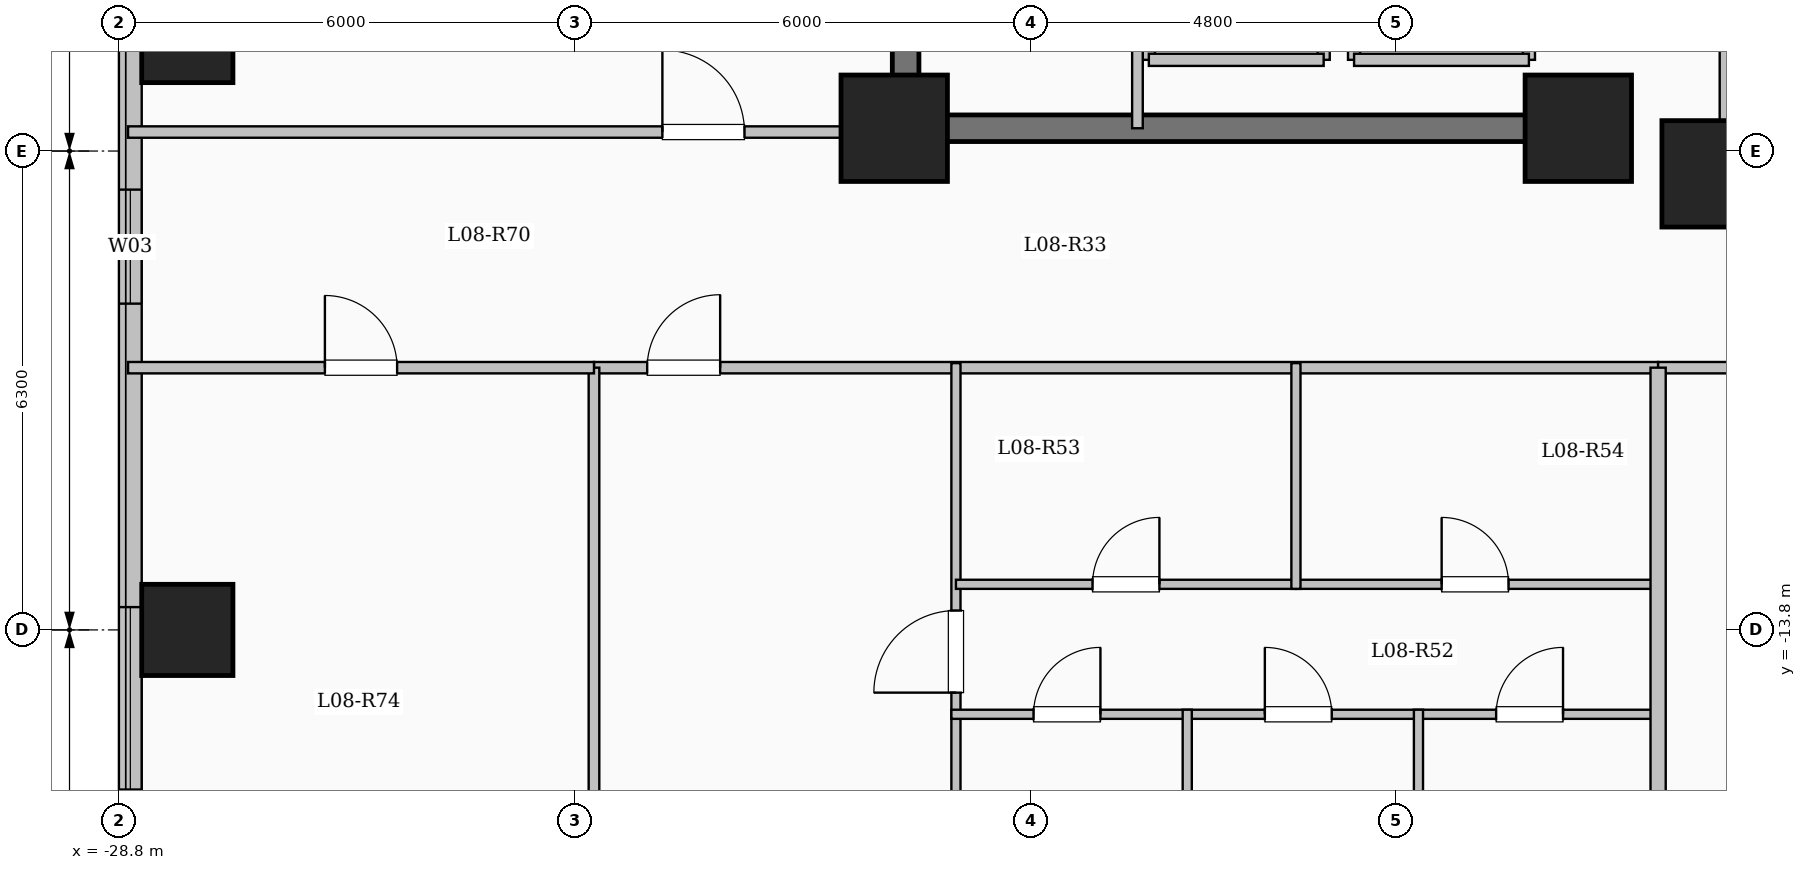
"""IFC4 building model, lengths in metres.
Left out: names, types, materials, properties, quantities, classifications, styles, units other than length and angle.
Written with IfcOpenShell. Run it as: python <this file> out.ifc"""

import sys

from ifc_helpers import new_model, si_unit, direction, frame, frame_2d, origin, origin_2d, place, context, subcontext, project, spatial, rectangle, extrude, element, fill, save


model = new_model("IFC4")
c1 = context("Model", 3, precision=1e-05, world=origin(), true_north=direction((0.0, 1.0)))
c2 = subcontext(c1, "Body", "Model", "MODEL_VIEW")
j1 = project(units=[si_unit("LENGTHUNIT", "METRE"), si_unit("PLANEANGLEUNIT", "RADIAN")], contexts=[c1])
p1 = place(None, origin())
s1 = spatial("IfcSite", under=j1, at=p1, CompositionType="ELEMENT")
p2 = place(p1, origin())
s2 = spatial("IfcBuilding", under=s1, at=p2, CompositionType="ELEMENT")
p3 = place(p2, frame((0.0, 0.0, 34.05)))
s3 = spatial("IfcBuildingStorey", under=s2, at=p3, CompositionType="ELEMENT", Elevation=34.05)
for number, where, z_axis, x_axis in (
    (1, (-7.8, -7.8, 0.0), (0.0, 0.0, 1.0), (1.0, 0.0, 0.0)),
    (2, (-9.6, -7.2, 0.0), (0.0, 0.0, 1.0), (1.0, 0.0, 0.0)),
    (3, (-18.6, -7.2, 0.0), (0.0, 0.0, 1.0), (1.0, 0.0, 0.0)),
):
    element("IfcColumn", number, at=place(p3, frame(where, z_axis=z_axis, x_axis=x_axis)), inside=s3, PredefinedType="COLUMN", context=c2, shape_type="SweptSolid", body=[
        extrude(rectangle(XDim=1.4, YDim=1.4, at=origin_2d()), origin(), (0.0, 0.0, 1.0), 3.35),
    ])
for number, where, z_axis, x_axis in (
    (4, (-27.9, -13.8, 0.0), (0.0, 0.0, 1.0), (1.0, 0.0, 0.0)),
    (5, (-27.9, -6.0, 0.0), (0.0, 0.0, 1.0), (1.0, 0.0, 0.0)),
):
    element("IfcColumn", number, at=place(p3, frame(where, z_axis=z_axis, x_axis=x_axis)), inside=s3, PredefinedType="COLUMN", context=c2, shape_type="SweptSolid", body=[
        extrude(rectangle(XDim=1.2, YDim=1.2, at=origin_2d()), origin(), (0.0, 0.0, 1.0), 3.35),
    ])
p4 = place(p3, frame((-7.62, 7.62, 0.0), z_axis=(0.0, 0.0, 1.0), x_axis=(0.0, -1.0, 0.0)))
e6 = element("IfcWall", 6, at=p4, inside=s3, PredefinedType="SOLIDWALL", context=c2, shape_type="SweptSolid", body=[
    extrude(rectangle(XDim=15.24, YDim=0.24, at=frame_2d((7.62, 0.0))), origin(), (0.0, 0.0, 1.0), 3.1),
])
p5 = place(p4, frame((6.92, 0.0, 0.95)))
e7 = element("IfcOpeningElement", 7, at=p5, cuts=e6, PredefinedType="OPENING", context=c2, shape_type="SweptSolid", body=[
    extrude(rectangle(XDim=1.4, YDim=1.5, at=frame_2d((0.7, 0.75))), frame((0.0, 0.13, 0.0), z_axis=(0.0, -1.0, 0.0), x_axis=(1.0, 0.0, 0.0)), (0.0, 0.0, 1.0), 0.26),
])
p6 = place(p3, frame((-28.65, -19.05, 0.0), z_axis=(0.0, 0.0, 1.0), x_axis=(0.0, 1.0, 0.0)))
e8 = element("IfcWall", 8, at=p6, inside=s3, PredefinedType="SOLIDWALL", context=c2, shape_type="SweptSolid", body=[
    extrude(rectangle(XDim=38.1, YDim=0.3, at=frame_2d((19.05, 0.0))), origin(), (0.0, 0.0, 1.0), 3.1),
])
p7 = place(p6, frame((3.15, 0.0, 0.9)))
e9 = element("IfcOpeningElement", 9, at=p7, cuts=e8, PredefinedType="OPENING", context=c2, shape_type="SweptSolid", body=[
    extrude(rectangle(XDim=2.4, YDim=1.8, at=frame_2d((1.2, 0.9))), frame((0.0, 0.16, 0.0), z_axis=(0.0, -1.0, 0.0), x_axis=(1.0, 0.0, 0.0)), (0.0, 0.0, 1.0), 0.32),
])
p8 = place(p6, frame((9.542, 0.0, 0.9)))
e10 = element("IfcOpeningElement", 10, at=p8, cuts=e8, PredefinedType="OPENING", context=c2, shape_type="SweptSolid", body=[
    extrude(rectangle(XDim=1.5, YDim=1.65, at=frame_2d((0.75, 0.825))), frame((0.0, 0.16, 0.0), z_axis=(0.0, -1.0, 0.0), x_axis=(1.0, 0.0, 0.0)), (0.0, 0.0, 1.0), 0.32),
])
p9 = place(p6, frame((19.8, 0.0, 0.9)))
e11 = element("IfcOpeningElement", 11, at=p9, cuts=e8, PredefinedType="OPENING", context=c2, shape_type="SweptSolid", body=[
    extrude(rectangle(XDim=2.0, YDim=1.7, at=frame_2d((1.0, 0.85))), frame((0.0, 0.16, 0.0), z_axis=(0.0, -1.0, 0.0), x_axis=(1.0, 0.0, 0.0)), (0.0, 0.0, 1.0), 0.32),
])
p10 = place(p6, frame((30.175, 0.0, 0.95)))
e12 = element("IfcOpeningElement", 12, at=p10, cuts=e8, PredefinedType="OPENING", context=c2, shape_type="SweptSolid", body=[
    extrude(rectangle(XDim=1.0, YDim=1.5, at=frame_2d((0.5, 0.75))), frame((0.0, 0.16, 0.0), z_axis=(0.0, -1.0, 0.0), x_axis=(1.0, 0.0, 0.0)), (0.0, 0.0, 1.0), 0.32),
])
p11 = place(p6, frame((33.85, 0.0, 0.9)))
e13 = element("IfcOpeningElement", 13, at=p11, cuts=e8, PredefinedType="OPENING", context=c2, shape_type="SweptSolid", body=[
    extrude(rectangle(XDim=2.0, YDim=1.7, at=frame_2d((1.0, 0.85))), frame((0.0, 0.16, 0.0), z_axis=(0.0, -1.0, 0.0), x_axis=(1.0, 0.0, 0.0)), (0.0, 0.0, 1.0), 0.32),
])
p12 = place(p3, frame((-12.55, -6.3, 0.0), z_axis=(0.0, 0.0, 1.0), x_axis=(0.0, 1.0, 0.0)))
e14 = element("IfcWall", 14, at=p12, inside=s3, PredefinedType="SOLIDWALL", context=c2, shape_type="SweptSolid", body=[
    extrude(rectangle(XDim=2.6, YDim=0.16, at=frame_2d((1.3, 0.0))), origin(), (0.0, 0.0, 1.0), 3.1),
])
p13 = place(p3, frame((-10.25, -6.3, 0.0), z_axis=(0.0, 0.0, 1.0), x_axis=(0.0, 1.0, 0.0)))
e15 = element("IfcWall", 15, at=p13, inside=s3, PredefinedType="SOLIDWALL", context=c2, shape_type="SweptSolid", body=[
    extrude(rectangle(XDim=2.6, YDim=0.16, at=frame_2d((1.3, 0.0))), origin(), (0.0, 0.0, 1.0), 3.1),
])
p14 = place(p13, frame((0.75, 0.0, 0.0)))
e16 = element("IfcOpeningElement", 16, at=p14, cuts=e15, PredefinedType="OPENING", context=c2, shape_type="SweptSolid", body=[
    extrude(rectangle(XDim=1.1, YDim=2.15, at=frame_2d((0.55, 1.075))), frame((0.0, 0.09, 0.0), z_axis=(0.0, -1.0, 0.0), x_axis=(1.0, 0.0, 0.0)), (0.0, 0.0, 1.0), 0.18),
])
p15 = place(p3, frame((-12.55, -6.3, 0.0), z_axis=(0.0, 0.0, 1.0), x_axis=(1.0, 0.0, 0.0)))
e17 = element("IfcWall", 17, at=p15, inside=s3, PredefinedType="SOLIDWALL", context=c2, shape_type="SweptSolid", body=[
    extrude(rectangle(XDim=2.3, YDim=0.16, at=frame_2d((1.15, 0.0))), origin(), (0.0, 0.0, 1.0), 3.1),
])
for number, where, z_axis, x_axis in (
    (18, (-15.25, -6.3, 0.0), (0.0, 0.0, 1.0), (0.0, 1.0, 0.0)),
    (19, (-12.95, -6.3, 0.0), (0.0, 0.0, 1.0), (0.0, 1.0, 0.0)),
):
    element("IfcWall", number, at=place(p3, frame(where, z_axis=z_axis, x_axis=x_axis)), inside=s3, PredefinedType="SOLIDWALL", context=c2, shape_type="SweptSolid", body=[
        extrude(rectangle(XDim=2.6, YDim=0.16, at=frame_2d((1.3, 0.0))), origin(), (0.0, 0.0, 1.0), 3.1),
    ])
p16 = place(p3, frame((-15.25, -6.3, 0.0), z_axis=(0.0, 0.0, 1.0), x_axis=(1.0, 0.0, 0.0)))
e20 = element("IfcWall", 20, at=p16, inside=s3, PredefinedType="SOLIDWALL", context=c2, shape_type="SweptSolid", body=[
    extrude(rectangle(XDim=2.3, YDim=0.16, at=frame_2d((1.15, 0.0))), origin(), (0.0, 0.0, 1.0), 3.1),
])
p17 = place(p3, frame((-18.45, -7.375, 0.0), z_axis=(0.0, 0.0, 1.0), x_axis=(0.0, 1.0, 0.0)))
e21 = element("IfcWall", 21, at=p17, inside=s3, PredefinedType="SHEAR", context=c2, shape_type="SweptSolid", body=[
    extrude(rectangle(XDim=14.05, YDim=0.35, at=frame_2d((7.025, 0.0))), origin(), (0.0, 0.0, 1.0), 3.35),
])
p18 = place(p3, frame((-18.625, -7.2, 0.0), z_axis=(0.0, 0.0, 1.0), x_axis=(1.0, 0.0, 0.0)))
e22 = element("IfcWall", 22, at=p18, inside=s3, PredefinedType="SHEAR", context=c2, shape_type="SweptSolid", body=[
    extrude(rectangle(XDim=8.55, YDim=0.35, at=frame_2d((4.275, 0.0))), origin(), (0.0, 0.0, 1.0), 3.35),
])
p19 = place(p3, frame((-15.4, -7.2, 0.0), z_axis=(0.0, 0.0, 1.0), x_axis=(0.0, 1.0, 0.0)))
e23 = element("IfcWall", 23, at=p19, inside=s3, PredefinedType="PARTITIONING", context=c2, shape_type="SweptSolid", body=[
    extrude(rectangle(XDim=10.45, YDim=0.14, at=frame_2d((5.225, 0.0))), origin(), (0.0, 0.0, 1.0), 3.1),
])
p20 = place(p19, frame((9.25, 0.0, 0.0)))
e24 = element("IfcOpeningElement", 24, at=p20, cuts=e23, PredefinedType="OPENING", context=c2, shape_type="SweptSolid", body=[
    extrude(rectangle(XDim=0.9, YDim=2.08, at=frame_2d((0.45, 1.04))), frame((0.0, 0.08, 0.0), z_axis=(0.0, -1.0, 0.0), x_axis=(1.0, 0.0, 0.0)), (0.0, 0.0, 1.0), 0.16),
])
p21 = place(p3, frame((-22.55, -10.35, 0.0), z_axis=(0.0, 0.0, 1.0), x_axis=(1.0, 0.0, 0.0)))
e25 = element("IfcWall", 25, at=p21, inside=s3, PredefinedType="PARTITIONING", context=c2, shape_type="SweptSolid", body=[
    extrude(rectangle(XDim=14.0, YDim=0.15, at=frame_2d((7.0, 0.0))), origin(), (0.0, 0.0, 1.0), 3.1),
])
p22 = place(p21, frame((0.7, 0.0, 0.0)))
e26 = element("IfcOpeningElement", 26, at=p22, cuts=e25, PredefinedType="OPENING", context=c2, shape_type="SweptSolid", body=[
    extrude(rectangle(XDim=0.96, YDim=2.15, at=frame_2d((0.48, 1.075))), frame((0.0, 0.085, 0.0), z_axis=(0.0, -1.0, 0.0), x_axis=(1.0, 0.0, 0.0)), (0.0, 0.0, 1.0), 0.17),
])
p23 = place(p3, frame((-8.55, -10.35, 0.0), z_axis=(0.0, 0.0, 1.0), x_axis=(1.0, 0.0, 0.0)))
e27 = element("IfcWall", 27, at=p23, inside=s3, PredefinedType="PARTITIONING", context=c2, shape_type="SweptSolid", body=[
    extrude(rectangle(XDim=17.1, YDim=0.15, at=frame_2d((8.55, 0.0))), origin(), (0.0, 0.0, 1.0), 3.1),
])
p24 = place(p23, frame((2.618, 0.0, 0.0)))
e28 = element("IfcOpeningElement", 28, at=p24, cuts=e27, PredefinedType="OPENING", context=c2, shape_type="SweptSolid", body=[
    extrude(rectangle(XDim=0.95, YDim=2.15, at=frame_2d((0.475, 1.075))), frame((0.0, 0.085, 0.0), z_axis=(0.0, -1.0, 0.0), x_axis=(1.0, 0.0, 0.0)), (0.0, 0.0, 1.0), 0.17),
])
p25 = place(p23, frame((8.754, 0.0, 0.0)))
e29 = element("IfcOpeningElement", 29, at=p25, cuts=e27, PredefinedType="OPENING", context=c2, shape_type="SweptSolid", body=[
    extrude(rectangle(XDim=0.95, YDim=2.15, at=frame_2d((0.475, 1.075))), frame((0.0, 0.085, 0.0), z_axis=(0.0, -1.0, 0.0), x_axis=(1.0, 0.0, 0.0)), (0.0, 0.0, 1.0), 0.17),
])
p26 = place(p23, frame((14.211, 0.0, 0.0)))
e30 = element("IfcOpeningElement", 30, at=p26, cuts=e27, PredefinedType="OPENING", context=c2, shape_type="SweptSolid", body=[
    extrude(rectangle(XDim=0.95, YDim=2.15, at=frame_2d((0.475, 1.075))), frame((0.0, 0.085, 0.0), z_axis=(0.0, -1.0, 0.0), x_axis=(1.0, 0.0, 0.0)), (0.0, 0.0, 1.0), 0.17),
])
p27 = place(p3, frame((-17.788, -23.6, 0.0), z_axis=(0.0, 0.0, 1.0), x_axis=(0.0, 1.0, 0.0)))
e31 = element("IfcWall", 31, at=p27, inside=s3, PredefinedType="PARTITIONING", context=c2, shape_type="SweptSolid", body=[
    extrude(rectangle(XDim=13.31, YDim=0.12, at=frame_2d((6.655, 0.0))), origin(), (0.0, 0.0, 1.0), 3.1),
])
p28 = place(p27, frame((8.975, 0.0, 0.0)))
e32 = element("IfcOpeningElement", 32, at=p28, cuts=e31, PredefinedType="OPENING", context=c2, shape_type="SweptSolid", body=[
    extrude(rectangle(XDim=1.08, YDim=2.15, at=frame_2d((0.54, 1.075))), frame((0.0, 0.07, 0.0), z_axis=(0.0, -1.0, 0.0), x_axis=(1.0, 0.0, 0.0)), (0.0, 0.0, 1.0), 0.14),
])
p29 = place(p3, frame((-17.788, -13.2, 0.0), z_axis=(0.0, 0.0, 1.0), x_axis=(1.0, 0.0, 0.0)))
e33 = element("IfcWall", 33, at=p29, inside=s3, PredefinedType="PARTITIONING", context=c2, shape_type="SweptSolid", body=[
    extrude(rectangle(XDim=4.473, YDim=0.12, at=frame_2d((2.237, 0.0))), origin(), (0.0, 0.0, 1.0), 3.1),
])
p30 = place(p29, frame((1.797, 0.0, 0.0)))
e34 = element("IfcOpeningElement", 34, at=p30, cuts=e33, PredefinedType="OPENING", context=c2, shape_type="SweptSolid", body=[
    extrude(rectangle(XDim=0.88, YDim=2.1, at=frame_2d((0.44, 1.05))), frame((0.0, 0.07, 0.0), z_axis=(0.0, -1.0, 0.0), x_axis=(1.0, 0.0, 0.0)), (0.0, 0.0, 1.0), 0.14),
])
p31 = place(p3, frame((-13.315, -13.2, 0.0), z_axis=(0.0, 0.0, 1.0), x_axis=(1.0, 0.0, 0.0)))
e35 = element("IfcWall", 35, at=p31, inside=s3, PredefinedType="PARTITIONING", context=c2, shape_type="SweptSolid", body=[
    extrude(rectangle(XDim=4.715, YDim=0.12, at=frame_2d((2.357, 0.0))), origin(), (0.0, 0.0, 1.0), 3.1),
])
p32 = place(p31, frame((1.917, 0.0, 0.0)))
e36 = element("IfcOpeningElement", 36, at=p32, cuts=e35, PredefinedType="OPENING", context=c2, shape_type="SweptSolid", body=[
    extrude(rectangle(XDim=0.88, YDim=2.1, at=frame_2d((0.44, 1.05))), frame((0.0, 0.07, 0.0), z_axis=(0.0, -1.0, 0.0), x_axis=(1.0, 0.0, 0.0)), (0.0, 0.0, 1.0), 0.14),
])
p33 = place(p3, frame((-17.848, -14.91, 0.0), z_axis=(0.0, 0.0, 1.0), x_axis=(1.0, 0.0, 0.0)))
e37 = element("IfcWall", 37, at=p33, inside=s3, PredefinedType="PARTITIONING", context=c2, shape_type="SweptSolid", body=[
    extrude(rectangle(XDim=9.308, YDim=0.12, at=frame_2d((4.654, 0.0))), origin(), (0.0, 0.0, 1.0), 2.585),
])
p34 = place(p33, frame((1.081, 0.0, 0.0)))
e38 = element("IfcOpeningElement", 38, at=p34, cuts=e37, PredefinedType="OPENING", context=c2, shape_type="SweptSolid", body=[
    extrude(rectangle(XDim=0.88, YDim=2.1, at=frame_2d((0.44, 1.05))), frame((0.0, 0.07, 0.0), z_axis=(0.0, -1.0, 0.0), x_axis=(1.0, 0.0, 0.0)), (0.0, 0.0, 1.0), 0.14),
])
p35 = place(p33, frame((4.124, 0.0, 0.0)))
e39 = element("IfcOpeningElement", 39, at=p35, cuts=e37, PredefinedType="OPENING", context=c2, shape_type="SweptSolid", body=[
    extrude(rectangle(XDim=0.88, YDim=2.1, at=frame_2d((0.44, 1.05))), frame((0.0, 0.07, 0.0), z_axis=(0.0, -1.0, 0.0), x_axis=(1.0, 0.0, 0.0)), (0.0, 0.0, 1.0), 0.14),
])
p36 = place(p33, frame((7.167, 0.0, 0.0)))
e40 = element("IfcOpeningElement", 40, at=p36, cuts=e37, PredefinedType="OPENING", context=c2, shape_type="SweptSolid", body=[
    extrude(rectangle(XDim=0.88, YDim=2.1, at=frame_2d((0.44, 1.05))), frame((0.0, 0.07, 0.0), z_axis=(0.0, -1.0, 0.0), x_axis=(1.0, 0.0, 0.0)), (0.0, 0.0, 1.0), 0.14),
])
p37 = place(p3, frame((-13.315, -13.26, 0.0), z_axis=(0.0, 0.0, 1.0), x_axis=(0.0, 1.0, 0.0)))
e41 = element("IfcWall", 41, at=p37, inside=s3, PredefinedType="PARTITIONING", context=c2, shape_type="SweptSolid", body=[
    extrude(rectangle(XDim=2.97, YDim=0.12, at=frame_2d((1.485, 0.0))), origin(), (0.0, 0.0, 1.0), 3.1),
])
p38 = place(p3, frame((-14.745, -23.6, 0.0), z_axis=(0.0, 0.0, 1.0), x_axis=(0.0, 1.0, 0.0)))
e42 = element("IfcWall", 42, at=p38, inside=s3, PredefinedType="PARTITIONING", context=c2, shape_type="SweptSolid", body=[
    extrude(rectangle(XDim=8.75, YDim=0.12, at=frame_2d((4.375, 0.0))), origin(), (0.0, 0.0, 1.0), 2.435),
])
p39 = place(p3, frame((-11.703, -23.6, 0.0), z_axis=(0.0, 0.0, 1.0), x_axis=(0.0, 1.0, 0.0)))
e43 = element("IfcWall", 43, at=p39, inside=s3, PredefinedType="PARTITIONING", context=c2, shape_type="SweptSolid", body=[
    extrude(rectangle(XDim=8.75, YDim=0.12, at=frame_2d((4.375, 0.0))), origin(), (0.0, 0.0, 1.0), 3.1),
])
p40 = place(p3, frame((-8.55, -24.204, 0.0), z_axis=(0.0, 0.0, 1.0), x_axis=(0.0, 1.0, 0.0)))
e44 = element("IfcWall", 44, at=p40, inside=s3, PredefinedType="SOLIDWALL", context=c2, shape_type="SweptSolid", body=[
    extrude(rectangle(XDim=13.854, YDim=0.2, at=frame_2d((6.927, 0.0))), origin(), (0.0, 0.0, 1.0), 3.1),
])
p41 = place(p3, frame((-28.68, -7.25, 0.0), z_axis=(0.0, 0.0, 1.0), x_axis=(1.0, 0.0, 0.0)))
e45 = element("IfcWall", 45, at=p41, inside=s3, PredefinedType="PARTITIONING", context=c2, shape_type="SweptSolid", body=[
    extrude(rectangle(XDim=10.23, YDim=0.15, at=frame_2d((5.115, 0.0))), origin(), (0.0, 0.0, 1.0), 3.1),
])
p42 = place(p41, frame((7.03, 0.0, 0.0)))
e46 = element("IfcOpeningElement", 46, at=p42, cuts=e45, PredefinedType="OPENING", context=c2, shape_type="SweptSolid", body=[
    extrude(rectangle(XDim=1.08, YDim=2.15, at=frame_2d((0.54, 1.075))), frame((0.0, 0.085, 0.0), z_axis=(0.0, -1.0, 0.0), x_axis=(1.0, 0.0, 0.0)), (0.0, 0.0, 1.0), 0.17),
])
p43 = place(p3, frame((-22.55, -19.05, 0.0), z_axis=(0.0, 0.0, 1.0), x_axis=(0.0, 1.0, 0.0)))
e47 = element("IfcWall", 47, at=p43, inside=s3, PredefinedType="PARTITIONING", context=c2, shape_type="SweptSolid", body=[
    extrude(rectangle(XDim=8.7, YDim=0.14, at=frame_2d((4.35, 0.0))), origin(), (0.0, 0.0, 1.0), 3.1),
])
p44 = place(p3, frame((-28.68, -10.35, 0.0), z_axis=(0.0, 0.0, 1.0), x_axis=(1.0, 0.0, 0.0)))
e48 = element("IfcWall", 48, at=p44, inside=s3, PredefinedType="PARTITIONING", context=c2, shape_type="SweptSolid", body=[
    extrude(rectangle(XDim=6.13, YDim=0.15, at=frame_2d((3.065, 0.0))), origin(), (0.0, 0.0, 1.0), 3.1),
])
p45 = place(p44, frame((2.59, 0.0, 0.0)))
e49 = element("IfcOpeningElement", 49, at=p45, cuts=e48, PredefinedType="OPENING", context=c2, shape_type="SweptSolid", body=[
    extrude(rectangle(XDim=0.95, YDim=2.15, at=frame_2d((0.475, 1.075))), frame((0.0, 0.085, 0.0), z_axis=(0.0, -1.0, 0.0), x_axis=(1.0, 0.0, 0.0)), (0.0, 0.0, 1.0), 0.17),
])
p46 = place(p7, origin())
e50 = element("IfcWindow", 50, at=p46, inside=s3, PartitioningType="SINGLE_PANEL", PredefinedType="WINDOW", context=c2, shape_type="SweptSolid", body=[
    extrude(rectangle(XDim=2.4, YDim=1.8, at=frame_2d((1.2, 0.9))), frame((0.0, 0.03, 0.0), z_axis=(0.0, -1.0, 0.0), x_axis=(1.0, 0.0, 0.0)), (0.0, 0.0, 1.0), 0.06),
])
fill(e9, e50)
p47 = place(p8, origin())
e51 = element("IfcWindow", 51, at=p47, inside=s3, PartitioningType="SINGLE_PANEL", PredefinedType="WINDOW", context=c2, shape_type="SweptSolid", body=[
    extrude(rectangle(XDim=1.5, YDim=1.65, at=frame_2d((0.75, 0.825))), frame((0.0, 0.03, 0.0), z_axis=(0.0, -1.0, 0.0), x_axis=(1.0, 0.0, 0.0)), (0.0, 0.0, 1.0), 0.06),
])
fill(e10, e51)
p48 = place(p22, origin())
e52 = element("IfcDoor", 52, at=p48, inside=s3, OperationType="SINGLE_SWING_RIGHT", PredefinedType="DOOR", context=c2, shape_type="SweptSolid", body=[
    extrude(rectangle(XDim=0.96, YDim=2.15, at=frame_2d((0.48, 1.075))), frame((0.0, 0.025, 0.0), z_axis=(0.0, -1.0, 0.0), x_axis=(1.0, 0.0, 0.0)), (0.0, 0.0, 1.0), 0.05),
])
fill(e26, e52)
p49 = place(p28, origin())
e53 = element("IfcDoor", 53, at=p49, inside=s3, OperationType="SINGLE_SWING_LEFT", PredefinedType="DOOR", context=c2, shape_type="SweptSolid", body=[
    extrude(rectangle(XDim=1.08, YDim=2.15, at=frame_2d((0.54, 1.075))), frame((0.0, 0.025, 0.0), z_axis=(0.0, -1.0, 0.0), x_axis=(1.0, 0.0, 0.0)), (0.0, 0.0, 1.0), 0.05),
])
fill(e32, e53)
p50 = place(p30, origin())
e54 = element("IfcDoor", 54, at=p50, inside=s3, OperationType="SINGLE_SWING_RIGHT", PredefinedType="DOOR", context=c2, shape_type="SweptSolid", body=[
    extrude(rectangle(XDim=0.88, YDim=2.1, at=frame_2d((0.44, 1.05))), frame((0.0, 0.025, 0.0), z_axis=(0.0, -1.0, 0.0), x_axis=(1.0, 0.0, 0.0)), (0.0, 0.0, 1.0), 0.05),
])
fill(e34, e54)
p51 = place(p32, origin())
e55 = element("IfcDoor", 55, at=p51, inside=s3, OperationType="SINGLE_SWING_LEFT", PredefinedType="DOOR", context=c2, shape_type="SweptSolid", body=[
    extrude(rectangle(XDim=0.88, YDim=2.1, at=frame_2d((0.44, 1.05))), frame((0.0, 0.025, 0.0), z_axis=(0.0, -1.0, 0.0), x_axis=(1.0, 0.0, 0.0)), (0.0, 0.0, 1.0), 0.05),
])
fill(e36, e55)
p52 = place(p34, origin())
e56 = element("IfcDoor", 56, at=p52, inside=s3, OperationType="SINGLE_SWING_RIGHT", PredefinedType="DOOR", context=c2, shape_type="SweptSolid", body=[
    extrude(rectangle(XDim=0.88, YDim=2.1, at=frame_2d((0.44, 1.05))), frame((0.0, 0.025, 0.0), z_axis=(0.0, -1.0, 0.0), x_axis=(1.0, 0.0, 0.0)), (0.0, 0.0, 1.0), 0.05),
])
fill(e38, e56)
p53 = place(p35, origin())
e57 = element("IfcDoor", 57, at=p53, inside=s3, OperationType="SINGLE_SWING_LEFT", PredefinedType="DOOR", context=c2, shape_type="SweptSolid", body=[
    extrude(rectangle(XDim=0.88, YDim=2.1, at=frame_2d((0.44, 1.05))), frame((0.0, 0.025, 0.0), z_axis=(0.0, -1.0, 0.0), x_axis=(1.0, 0.0, 0.0)), (0.0, 0.0, 1.0), 0.05),
])
fill(e39, e57)
p54 = place(p36, origin())
e58 = element("IfcDoor", 58, at=p54, inside=s3, OperationType="SINGLE_SWING_RIGHT", PredefinedType="DOOR", context=c2, shape_type="SweptSolid", body=[
    extrude(rectangle(XDim=0.88, YDim=2.1, at=frame_2d((0.44, 1.05))), frame((0.0, 0.025, 0.0), z_axis=(0.0, -1.0, 0.0), x_axis=(1.0, 0.0, 0.0)), (0.0, 0.0, 1.0), 0.05),
])
fill(e40, e58)
p55 = place(p45, origin())
e59 = element("IfcDoor", 59, at=p55, inside=s3, OperationType="SINGLE_SWING_LEFT", PredefinedType="DOOR", context=c2, shape_type="SweptSolid", body=[
    extrude(rectangle(XDim=0.95, YDim=2.15, at=frame_2d((0.475, 1.075))), frame((0.0, 0.025, 0.0), z_axis=(0.0, -1.0, 0.0), x_axis=(1.0, 0.0, 0.0)), (0.0, 0.0, 1.0), 0.05),
])
fill(e49, e59)
p56 = place(p42, origin())
e60 = element("IfcDoor", 60, at=p56, inside=s3, OperationType="SINGLE_SWING_LEFT", PredefinedType="DOOR", context=c2, shape_type="SweptSolid", body=[
    extrude(rectangle(XDim=1.08, YDim=2.15, at=frame_2d((0.54, 1.075))), frame((0.0, 0.025, 0.0), z_axis=(0.0, -1.0, 0.0), x_axis=(1.0, 0.0, 0.0)), (0.0, 0.0, 1.0), 0.05),
])
fill(e46, e60)
save(model, sys.argv[1])
